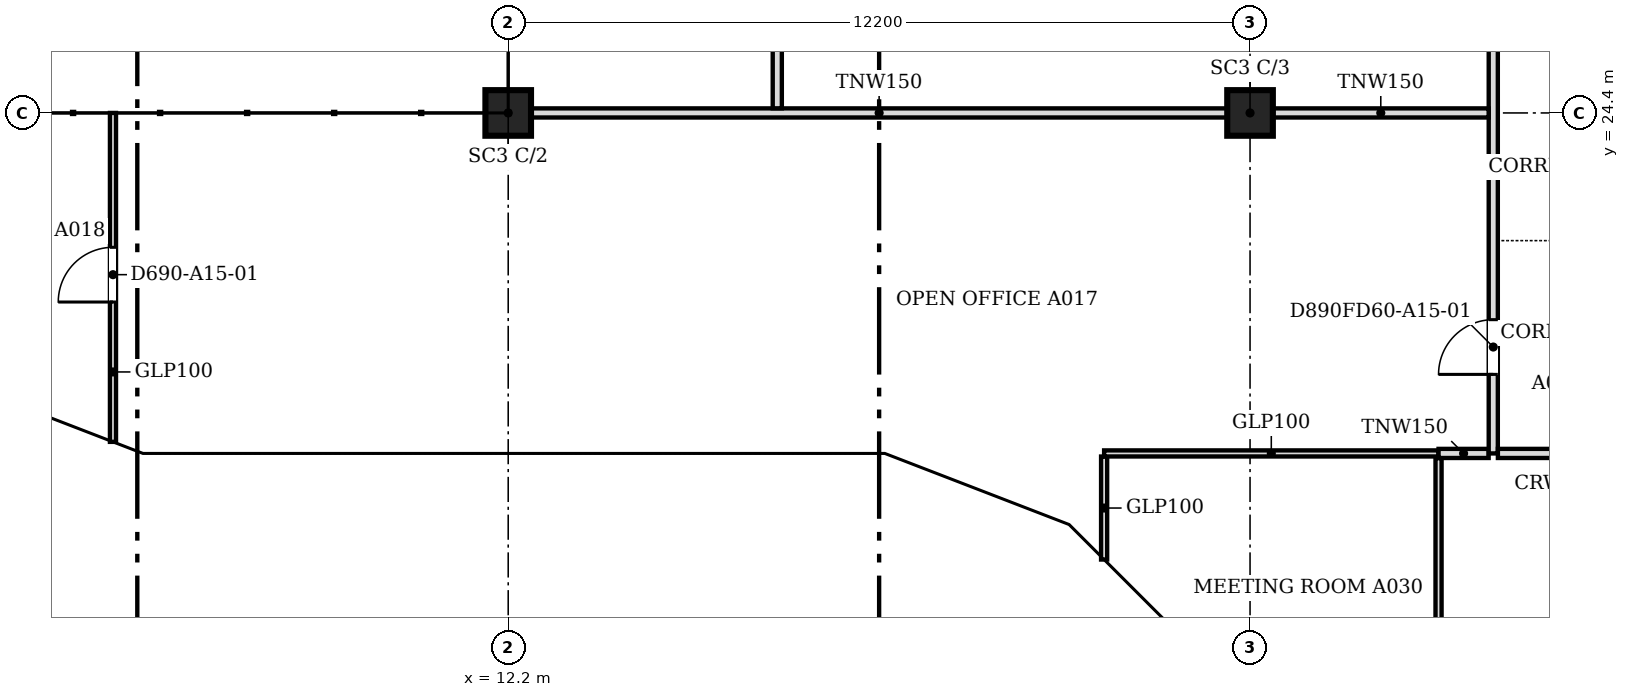
"""IFC4 building model, lengths in metres.
Left out: names, types, materials, properties, quantities, classifications, styles, units other than length and angle.
Written with IfcOpenShell. Run it as: python <this file> out.ifc"""

import sys

from ifc_helpers import new_model, si_unit, direction, frame, frame_2d, origin, origin_2d, place, context, subcontext, project, spatial, polyline, rectangle, outline, extrude, faceted_brep, source, transform, mapped, element, fill, save


model = new_model("IFC4")
c1 = context("Model", 3, precision=1e-05, world=origin(), true_north=direction((0.0, 1.0)))
c2 = subcontext(c1, "Body", "Model", "MODEL_VIEW")
j1 = project(units=[si_unit("LENGTHUNIT", "METRE"), si_unit("PLANEANGLEUNIT", "RADIAN")], contexts=[c1])
p1 = place(None, origin())
s1 = spatial("IfcSite", under=j1, at=p1, CompositionType="ELEMENT")
p2 = place(p1, origin())
s2 = spatial("IfcBuilding", under=s1, at=p2, CompositionType="ELEMENT")
p3 = place(p2, frame((0.0, 0.0, 170.6)))
s3 = spatial("IfcBuildingStorey", under=s2, at=p3, CompositionType="ELEMENT", Elevation=170.6)
for number, where, z_axis, x_axis in (
    (1, (12.2, 24.4, 0.0), (0.0, 0.0, 1.0), (1.0, 0.0, 0.0)),
    (2, (24.4, 24.4, 0.0), (0.0, 0.0, 1.0), (1.0, 0.0, 0.0)),
):
    element("IfcColumn", number, at=place(p3, frame(where, z_axis=z_axis, x_axis=x_axis)), inside=s3, PredefinedType="COLUMN", context=c2, shape_type="SweptSolid", body=[
        extrude(rectangle(XDim=0.75, YDim=0.75, at=origin_2d()), origin(), (0.0, 0.0, 1.0), 3.6),
    ])
m1 = source(origin(), c2, "Body", "Brep", [
    faceted_brep([(2.95, -0.25, 0.0), (2.997, -0.25, 0.059), (2.997, -0.25, 7.541), (2.95, -0.25, 7.6), (0.0, -0.25, 3.8), (0.053, 0.25, 3.868), (2.904, 0.25, 7.54), (2.904, 0.25, 0.06), (0.053, 0.25, 3.732), (2.95, 0.0, 0.0), (2.95, 0.0, 7.6), (0.0, 0.0, 3.8)], [[[0, 1, 2, 3, 4]], [[5, 6, 7, 8]], [[1, 0, 9]], [[10, 3, 2]], [[6, 5, 11, 4, 3, 10]], [[8, 7, 9, 0, 4, 11]], [[8, 11, 5]], [[1, 9, 7, 6, 10, 2]]]),
])
p4 = place(p3, frame((3.394, 19.612, -3.8), z_axis=(0.0, 0.0, 1.0), x_axis=(0.932990326376, -0.359901446078, 0.0)))
e3 = element("IfcWall", 3, at=p4, inside=s3, PredefinedType="SOLIDWALL", context=c2, shape_type="MappedRepresentation", body=[
    mapped(m1, transform((0.0, 0.0, 0.0), scale=1.0)),
])
m2 = source(origin(), c2, "Body", "SweptSolid", [
    extrude(outline(polyline([(2.75, 6.935), (0.316, 3.8), (2.75, 0.665), (2.75, 6.935)])), frame((0.0, 0.26, 0.0), z_axis=(0.0, -1.0, 0.0), x_axis=(1.0, 0.0, 0.0)), (0.0, 0.0, 1.0), 0.52),
])
p5 = place(p4, origin())
e4 = element("IfcOpeningElement", 4, at=p5, cuts=e3, PredefinedType="OPENING", context=c2, shape_type="MappedRepresentation", body=[
    mapped(m2, transform((0.0, 0.0, 0.0), scale=1.0)),
])
m3 = source(origin(), c2, "Body", "Brep", [
    faceted_brep([(0.047, -0.25, 0.0), (3.05, -0.25, 3.8), (0.047, -0.25, 7.6), (0.0, -0.25, 7.54), (0.0, -0.25, 0.06), (0.093, 0.25, 7.541), (3.05, 0.25, 3.8), (0.093, 0.25, 0.059), (0.047, 0.0, 0.0), (0.047, 0.0, 7.6)], [[[0, 1, 2, 3, 4]], [[5, 6, 7]], [[7, 6, 1, 0, 8]], [[6, 5, 9, 2, 1]], [[3, 2, 9]], [[8, 0, 4]], [[7, 8, 4, 3, 9, 5]]]),
])
p6 = place(p3, frame((6.1, 18.55, -3.8), z_axis=(0.0, 0.0, 1.0), x_axis=(1.0, 0.0, 0.0)))
e5 = element("IfcWall", 5, at=p6, inside=s3, PredefinedType="SOLIDWALL", context=c2, shape_type="MappedRepresentation", body=[
    mapped(m3, transform((0.0, 0.0, 0.0), scale=1.0)),
])
m4 = source(origin(), c2, "Body", "SweptSolid", [
    extrude(outline(polyline([(0.247, 0.656), (2.731, 3.8), (0.247, 6.944), (0.247, 0.656)])), frame((0.0, 0.26, 0.0), z_axis=(0.0, -1.0, 0.0), x_axis=(1.0, 0.0, 0.0)), (0.0, 0.0, 1.0), 0.52),
])
p7 = place(p6, origin())
e6 = element("IfcOpeningElement", 6, at=p7, cuts=e5, PredefinedType="OPENING", context=c2, shape_type="MappedRepresentation", body=[
    mapped(m4, transform((0.0, 0.0, 0.0), scale=1.0)),
])
m5 = source(origin(), c2, "Body", "SweptSolid", [
    extrude(outline(polyline([(3.05, 0.0), (6.1, 3.8), (3.05, 7.6), (0.0, 3.8), (3.05, 0.0)])), frame((0.0, 0.25, 0.0), z_axis=(0.0, -1.0, 0.0), x_axis=(1.0, 0.0, 0.0)), (0.0, 0.0, 1.0), 0.5),
])
p8 = place(p3, frame((9.15, 18.55, -3.8), z_axis=(0.0, 0.0, 1.0), x_axis=(1.0, 0.0, 0.0)))
e7 = element("IfcWall", 7, at=p8, inside=s3, PredefinedType="SOLIDWALL", context=c2, shape_type="MappedRepresentation", body=[
    mapped(m5, transform((0.0, 0.0, 0.0), scale=1.0)),
])
m6 = source(origin(), c2, "Body", "SweptSolid", [
    extrude(outline(polyline([(3.05, 0.399), (5.78, 3.8), (3.05, 7.2), (0.321, 3.8), (3.05, 0.399)])), frame((0.0, 0.26, 0.0), z_axis=(0.0, -1.0, 0.0), x_axis=(1.0, 0.0, 0.0)), (0.0, 0.0, 1.0), 0.52),
])
p9 = place(p8, origin())
e8 = element("IfcOpeningElement", 8, at=p9, cuts=e7, PredefinedType="OPENING", context=c2, shape_type="MappedRepresentation", body=[
    mapped(m6, transform((0.0, 0.0, 0.0), scale=1.0)),
])
m7 = source(origin(), c2, "Body", "Brep", [
    faceted_brep([(3.05, -0.25, 7.543), (0.0, -0.25, 3.8), (3.05, -0.25, 0.057), (0.0, 0.25, 3.8), (3.096, 0.25, 7.6), (3.143, 0.25, 7.543), (3.143, 0.25, 0.056), (3.096, 0.25, 0.0), (3.096, -0.0, 0.0), (3.096, -0.0, 7.6)], [[[0, 1, 2]], [[3, 4, 5, 6, 7]], [[7, 6, 8]], [[5, 4, 9]], [[4, 3, 1, 0, 9]], [[3, 7, 8, 2, 1]], [[2, 8, 6, 5, 9, 0]]]),
])
p10 = place(p3, frame((15.25, 18.55, -3.8), z_axis=(0.0, 0.0, 1.0), x_axis=(1.0, 0.0, 0.0)))
e9 = element("IfcWall", 9, at=p10, inside=s3, PredefinedType="SOLIDWALL", context=c2, shape_type="MappedRepresentation", body=[
    mapped(m7, transform((0.0, 0.0, 0.0), scale=1.0)),
])
m8 = source(origin(), c2, "Body", "SweptSolid", [
    extrude(outline(polyline([(2.896, 6.959), (0.323, 3.8), (2.896, 0.641), (2.896, 6.959)])), frame((0.0, 0.26, 0.0), z_axis=(0.0, -1.0, 0.0), x_axis=(1.0, 0.0, 0.0)), (0.0, 0.0, 1.0), 0.52),
])
p11 = place(p10, origin())
e10 = element("IfcOpeningElement", 10, at=p11, cuts=e9, PredefinedType="OPENING", context=c2, shape_type="MappedRepresentation", body=[
    mapped(m8, transform((0.0, 0.0, 0.0), scale=1.0)),
])
m9 = source(origin(), c2, "Body", "Brep", [
    faceted_brep([(0.093, -0.25, 0.056), (3.143, -0.25, 3.736), (3.143, -0.25, 3.864), (0.093, -0.25, 7.544), (0.0, 0.25, 7.543), (0.047, 0.25, 7.6), (3.196, 0.25, 3.8), (0.047, 0.25, 0.0), (0.0, 0.25, 0.057), (3.196, -0.0, 3.8), (0.047, 0.0, 0.0), (0.047, 0.0, 7.6)], [[[0, 1, 2, 3]], [[4, 5, 6, 7, 8]], [[7, 6, 9, 1, 0, 10]], [[6, 5, 11, 3, 2, 9]], [[5, 4, 11]], [[8, 7, 10]], [[8, 10, 0, 3, 11, 4]], [[1, 9, 2]]]),
])
p12 = place(p3, frame((18.303, 18.567, -3.8), z_axis=(0.0, 0.0, 1.0), x_axis=(0.932978940178, -0.359930961693, 0.0)))
e11 = element("IfcWall", 11, at=p12, inside=s3, PredefinedType="SOLIDWALL", context=c2, shape_type="MappedRepresentation", body=[
    mapped(m9, transform((0.0, 0.0, 0.0), scale=1.0)),
])
m10 = source(origin(), c2, "Body", "SweptSolid", [
    extrude(outline(polyline([(0.247, 0.633), (2.871, 3.8), (0.247, 6.967), (0.247, 0.633)])), frame((0.0, 0.26, 0.0), z_axis=(0.0, -1.0, 0.0), x_axis=(1.0, 0.0, 0.0)), (0.0, 0.0, 1.0), 0.52),
])
p13 = place(p12, origin())
e12 = element("IfcOpeningElement", 12, at=p13, cuts=e11, PredefinedType="OPENING", context=c2, shape_type="MappedRepresentation", body=[
    mapped(m10, transform((0.0, 0.0, 0.0), scale=1.0)),
])
m11 = source(origin(), c2, "Body", "Brep", [
    faceted_brep([(3.103, -0.25, 7.536), (0.053, -0.25, 3.864), (0.053, -0.25, 3.736), (3.103, -0.25, 0.064), (0.0, 0.25, 3.8), (3.156, 0.25, 7.6), (3.209, 0.25, 7.536), (3.209, 0.25, 0.064), (3.156, 0.25, 0.0), (3.156, -0.0, 0.0), (3.156, -0.0, 7.6), (0.0, 0.0, 3.8)], [[[0, 1, 2, 3]], [[4, 5, 6, 7, 8]], [[8, 7, 9]], [[6, 5, 10]], [[5, 4, 11, 1, 0, 10]], [[4, 8, 9, 3, 2, 11]], [[2, 1, 11]], [[3, 9, 7, 6, 10, 0]]]),
])
p14 = place(p3, frame((21.285, 17.417, -3.8), z_axis=(0.0, 0.0, 1.0), x_axis=(0.707106781187, -0.707106781187, 0.0)))
e13 = element("IfcWall", 13, at=p14, inside=s3, PredefinedType="SOLIDWALL", context=c2, shape_type="MappedRepresentation", body=[
    mapped(m11, transform((0.0, 0.0, 0.0), scale=1.0)),
])
m12 = source(origin(), c2, "Body", "SweptSolid", [
    extrude(outline(polyline([(2.956, 6.968), (0.325, 3.8), (2.956, 0.632), (2.956, 6.968)])), frame((0.0, 0.26, 0.0), z_axis=(0.0, -1.0, 0.0), x_axis=(1.0, 0.0, 0.0)), (0.0, 0.0, 1.0), 0.52),
])
p15 = place(p14, origin())
e14 = element("IfcOpeningElement", 14, at=p15, cuts=e13, PredefinedType="OPENING", context=c2, shape_type="MappedRepresentation", body=[
    mapped(m12, transform((0.0, 0.0, 0.0), scale=1.0)),
])
p16 = place(p2, frame((0.0, 0.0, 174.4)))
s4 = spatial("IfcBuildingStorey", under=s2, at=p16, CompositionType="ELEMENT", Elevation=174.4)
m13 = source(origin(), c2, "Body", "Brep", [
    faceted_brep([(0.053, -0.25, 0.0), (3.003, -0.25, 3.8), (0.053, -0.25, 7.6), (0.0, -0.25, 7.531), (0.0, -0.25, 0.068), (0.106, 0.25, 7.532), (2.957, 0.25, 3.86), (2.957, 0.25, 3.74), (0.106, 0.25, 0.068), (3.003, 0.0, 3.8), (0.053, 0.0, 0.0), (0.053, 0.0, 7.6)], [[[0, 1, 2, 3, 4]], [[5, 6, 7, 8]], [[8, 7, 9, 1, 0, 10]], [[6, 5, 11, 2, 1, 9]], [[3, 2, 11]], [[10, 0, 4]], [[8, 10, 4, 3, 11, 5]], [[9, 7, 6]]]),
])
p17 = place(p16, frame((3.344, 19.631, -3.8), z_axis=(0.0, 0.0, 1.0), x_axis=(0.933007896601, -0.359855894603, 0.0)))
e15 = element("IfcWall", 15, at=p17, inside=s4, PredefinedType="SOLIDWALL", context=c2, shape_type="MappedRepresentation", body=[
    mapped(m13, transform((0.0, 0.0, 0.0), scale=1.0)),
])
m14 = source(origin(), c2, "Body", "SweptSolid", [
    extrude(outline(polyline([(0.253, 0.665), (2.687, 3.8), (0.253, 6.935), (0.253, 0.665)])), frame((0.0, 0.26, 0.0), z_axis=(0.0, -1.0, 0.0), x_axis=(1.0, 0.0, 0.0)), (0.0, 0.0, 1.0), 0.52),
])
p18 = place(p17, origin())
e16 = element("IfcOpeningElement", 16, at=p18, cuts=e15, PredefinedType="OPENING", context=c2, shape_type="MappedRepresentation", body=[
    mapped(m14, transform((0.0, 0.0, 0.0), scale=1.0)),
])
m15 = source(origin(), c2, "Body", "Brep", [
    faceted_brep([(3.003, -0.25, 0.0), (6.053, -0.25, 3.8), (3.003, -0.25, 7.6), (0.0, -0.25, 3.8), (0.047, 0.25, 3.859), (3.003, 0.25, 7.6), (6.053, 0.25, 3.8), (3.003, 0.25, 0.0), (0.047, 0.25, 3.741), (0.0, 0.0, 3.8)], [[[0, 1, 2, 3]], [[4, 5, 6, 7, 8]], [[7, 6, 1, 0]], [[6, 5, 2, 1]], [[5, 4, 9, 3, 2]], [[8, 7, 0, 3, 9]], [[8, 9, 4]]]),
])
p19 = place(p16, frame((6.146, 18.55, -3.8), z_axis=(0.0, 0.0, 1.0), x_axis=(1.0, 0.0, 0.0)))
e17 = element("IfcWall", 17, at=p19, inside=s4, PredefinedType="SOLIDWALL", context=c2, shape_type="MappedRepresentation", body=[
    mapped(m15, transform((0.0, 0.0, 0.0), scale=1.0)),
])
m16 = source(origin(), c2, "Body", "SweptSolid", [
    extrude(outline(polyline([(3.005, 0.401), (5.733, 3.8), (3.005, 7.199), (0.319, 3.8), (3.005, 0.401)])), frame((0.0, 0.26, 0.0), z_axis=(0.0, -1.0, 0.0), x_axis=(1.0, 0.0, 0.0)), (0.0, 0.0, 1.0), 0.52),
])
p20 = place(p19, origin())
e18 = element("IfcOpeningElement", 18, at=p20, cuts=e17, PredefinedType="OPENING", context=c2, shape_type="MappedRepresentation", body=[
    mapped(m16, transform((0.0, 0.0, 0.0), scale=1.0)),
])
m17 = source(origin(), c2, "Body", "Brep", [
    faceted_brep([(3.05, -0.25, 0.0), (6.1, -0.25, 3.743), (6.1, -0.25, 3.857), (3.05, -0.25, 7.6), (0.0, -0.25, 3.8), (0.0, 0.25, 3.8), (3.05, 0.25, 7.6), (6.146, 0.25, 3.8), (3.05, 0.25, 0.0), (6.146, -0.0, 3.8)], [[[0, 1, 2, 3, 4]], [[5, 6, 7, 8]], [[8, 7, 9, 1, 0]], [[7, 6, 3, 2, 9]], [[6, 5, 4, 3]], [[5, 8, 0, 4]], [[1, 9, 2]]]),
])
p21 = place(p16, frame((12.2, 18.55, -3.8), z_axis=(0.0, 0.0, 1.0), x_axis=(1.0, 0.0, 0.0)))
e19 = element("IfcWall", 19, at=p21, inside=s4, PredefinedType="SOLIDWALL", context=c2, shape_type="MappedRepresentation", body=[
    mapped(m17, transform((0.0, 0.0, 0.0), scale=1.0)),
])
m18 = source(origin(), c2, "Body", "SweptSolid", [
    extrude(outline(polyline([(3.052, 0.397), (5.824, 3.8), (3.052, 7.202), (0.321, 3.8), (3.052, 0.397)])), frame((0.0, 0.26, 0.0), z_axis=(0.0, -1.0, 0.0), x_axis=(1.0, 0.0, 0.0)), (0.0, 0.0, 1.0), 0.52),
])
p22 = place(p21, origin())
e20 = element("IfcOpeningElement", 20, at=p22, cuts=e19, PredefinedType="OPENING", context=c2, shape_type="MappedRepresentation", body=[
    mapped(m18, transform((0.0, 0.0, 0.0), scale=1.0)),
])
m19 = source(origin(), c2, "Body", "Brep", [
    faceted_brep([(3.096, -0.25, 7.536), (0.047, -0.25, 3.856), (0.047, -0.25, 3.744), (3.096, -0.25, 0.064), (0.0, 0.25, 3.8), (3.149, 0.25, 7.6), (3.202, 0.25, 7.536), (3.202, 0.25, 0.064), (3.149, 0.25, 0.0), (3.149, -0.0, 0.0), (3.149, -0.0, 7.6), (0.0, 0.0, 3.8)], [[[0, 1, 2, 3]], [[4, 5, 6, 7, 8]], [[8, 7, 9]], [[6, 5, 10]], [[5, 4, 11, 1, 0, 10]], [[4, 8, 9, 3, 2, 11]], [[11, 2, 1]], [[3, 9, 7, 6, 10, 0]]]),
])
p23 = place(p16, frame((18.346, 18.55, -3.8), z_axis=(0.0, 0.0, 1.0), x_axis=(0.932985567668, -0.359913782069, 0.0)))
e21 = element("IfcWall", 21, at=p23, inside=s4, PredefinedType="SOLIDWALL", context=c2, shape_type="MappedRepresentation", body=[
    mapped(m19, transform((0.0, 0.0, 0.0), scale=1.0)),
])
m20 = source(origin(), c2, "Body", "SweptSolid", [
    extrude(outline(polyline([(2.949, 6.967), (0.325, 3.8), (2.949, 0.633), (2.949, 6.967)])), frame((0.0, 0.26, 0.0), z_axis=(0.0, -1.0, 0.0), x_axis=(1.0, 0.0, 0.0)), (0.0, 0.0, 1.0), 0.52),
])
p24 = place(p23, origin())
e22 = element("IfcOpeningElement", 22, at=p24, cuts=e21, PredefinedType="OPENING", context=c2, shape_type="MappedRepresentation", body=[
    mapped(m20, transform((0.0, 0.0, 0.0), scale=1.0)),
])
m21 = source(origin(), c2, "Body", "Brep", [
    faceted_brep([(0.106, -0.25, 0.064), (3.156, -0.25, 3.736), (3.156, -0.25, 3.864), (0.106, -0.25, 7.536), (0.0, 0.25, 7.536), (0.053, 0.25, 7.6), (3.209, 0.25, 3.8), (0.053, 0.25, 0.0), (0.0, 0.25, 0.064), (3.209, -0.0, 3.8), (0.053, 0.0, 0.0), (0.053, 0.0, 7.6)], [[[0, 1, 2, 3]], [[4, 5, 6, 7, 8]], [[7, 6, 9, 1, 0, 10]], [[6, 5, 11, 3, 2, 9]], [[5, 4, 11]], [[8, 7, 10]], [[8, 10, 0, 3, 11, 4]], [[1, 9, 2]]]),
])
p25 = place(p16, frame((21.248, 17.454, -3.8), z_axis=(0.0, 0.0, 1.0), x_axis=(0.707106781187, -0.707106781187, 0.0)))
e23 = element("IfcWall", 23, at=p25, inside=s4, PredefinedType="SOLIDWALL", context=c2, shape_type="MappedRepresentation", body=[
    mapped(m21, transform((0.0, 0.0, 0.0), scale=1.0)),
])
m22 = source(origin(), c2, "Body", "SweptSolid", [
    extrude(outline(polyline([(0.253, 0.632), (2.884, 3.8), (0.253, 6.968), (0.253, 0.632)])), frame((0.0, 0.26, 0.0), z_axis=(0.0, -1.0, 0.0), x_axis=(1.0, 0.0, 0.0)), (0.0, 0.0, 1.0), 0.52),
])
p26 = place(p25, origin())
e24 = element("IfcOpeningElement", 24, at=p26, cuts=e23, PredefinedType="OPENING", context=c2, shape_type="MappedRepresentation", body=[
    mapped(m22, transform((0.0, 0.0, 0.0), scale=1.0)),
])
p27 = place(p3, frame((27.5, 10.276, 0.0), z_axis=(0.0, 0.0, 1.0), x_axis=(0.0, 1.0, 0.0)))
e25 = element("IfcWall", 25, at=p27, inside=s3, PredefinedType="PARTITIONING", context=c2, shape_type="SweptSolid", body=[
    extrude(rectangle(XDim=8.448, YDim=0.1, at=frame_2d((4.224, 0.0))), origin(), (0.0, 0.0, 1.0), 3.067),
])
m23 = source(origin(), c2, "Body", "SweptSolid", [
    extrude(rectangle(XDim=0.9, YDim=2.1, at=frame_2d((0.45, 1.05))), frame((0.0, 0.06, 0.0), z_axis=(0.0, -1.0, 0.0), x_axis=(1.0, 0.0, 0.0)), (0.0, 0.0, 1.0), 0.12),
])
p28 = place(p27, frame((3.8, 0.0, 0.0)))
e26 = element("IfcOpeningElement", 26, at=p28, cuts=e25, PredefinedType="OPENING", context=c2, shape_type="MappedRepresentation", body=[
    mapped(m23, transform((0.0, 0.0, 0.0), scale=1.0)),
])
p29 = place(p3, frame((22.0, 17.055, 0.0), z_axis=(0.0, 0.0, 1.0), x_axis=(0.0, 1.0, 0.0)))
e27 = element("IfcWall", 27, at=p29, inside=s3, PredefinedType="PARTITIONING", context=c2, shape_type="SweptSolid", body=[
    extrude(rectangle(XDim=1.694, YDim=0.1, at=frame_2d((0.847, 0.0))), origin(), (0.0, 0.0, 1.0), 3.067),
])
p30 = place(p3, frame((22.0, 18.8, 0.0), z_axis=(0.0, 0.0, 1.0), x_axis=(1.0, 0.0, 0.0)))
e28 = element("IfcWall", 28, at=p30, inside=s3, PredefinedType="PARTITIONING", context=c2, shape_type="SweptSolid", body=[
    extrude(rectangle(XDim=5.499, YDim=0.1, at=frame_2d((2.75, 0.0))), origin(), (0.0, 0.0, 1.0), 3.067),
])
p31 = place(p3, frame((27.5, 18.8, 0.0), z_axis=(0.0, 0.0, 1.0), x_axis=(1.0, 0.0, 0.0)))
e29 = element("IfcWall", 29, at=p31, inside=s3, PredefinedType="PARTITIONING", context=c2, shape_type="SweptSolid", body=[
    extrude(rectangle(XDim=0.824, YDim=0.15, at=frame_2d((0.412, 0.0))), origin(), (0.0, 0.0, 1.0), 3.067),
])
p32 = place(p3, frame((28.4, 18.8, 0.0), z_axis=(0.0, 0.0, 1.0), x_axis=(0.0, 1.0, 0.0)))
e30 = element("IfcWall", 30, at=p32, inside=s3, PredefinedType="PARTITIONING", context=c2, shape_type="SweptSolid", body=[
    extrude(rectangle(XDim=26.824, YDim=0.15, at=frame_2d((13.412, 0.0))), origin(), (0.0, 0.0, 1.0), 3.067),
])
m24 = source(origin(), c2, "Body", "SweptSolid", [
    extrude(rectangle(XDim=0.9, YDim=2.1, at=frame_2d((0.45, 1.05))), frame((0.0, 0.085, 0.0), z_axis=(0.0, -1.0, 0.0), x_axis=(1.0, 0.0, 0.0)), (0.0, 0.0, 1.0), 0.17),
])
p33 = place(p32, frame((1.3, 0.0, 0.0)))
e31 = element("IfcOpeningElement", 31, at=p33, cuts=e30, PredefinedType="OPENING", context=c2, shape_type="MappedRepresentation", body=[
    mapped(m24, transform((0.0, 0.0, 0.0), scale=1.0)),
])
m25 = source(origin(), c2, "Body", "SweptSolid", [
    extrude(rectangle(XDim=1.0, YDim=2.1, at=frame_2d((0.5, 1.05))), frame((0.0, 0.085, 0.0), z_axis=(0.0, -1.0, 0.0), x_axis=(1.0, 0.0, 0.0)), (0.0, 0.0, 1.0), 0.17),
])
p34 = place(p32, frame((23.351, 0.0, 0.0)))
e32 = element("IfcOpeningElement", 32, at=p34, cuts=e30, PredefinedType="OPENING", context=c2, shape_type="MappedRepresentation", body=[
    mapped(m25, transform((0.0, 0.0, 0.0), scale=1.0)),
])
p35 = place(p32, frame((8.1, 0.0, 0.0)))
e33 = element("IfcOpeningElement", 33, at=p35, cuts=e30, PredefinedType="OPENING", context=c2, shape_type="MappedRepresentation", body=[
    mapped(m25, transform((0.0, 0.0, 0.0), scale=1.0)),
])
p36 = place(p32, frame((15.8, 0.0, 0.0)))
e34 = element("IfcOpeningElement", 34, at=p36, cuts=e30, PredefinedType="OPENING", context=c2, shape_type="MappedRepresentation", body=[
    mapped(m24, transform((0.0, 0.0, 0.0), scale=1.0)),
])
p37 = place(p3, frame((28.476, 18.8, 0.0), z_axis=(0.0, 0.0, 1.0), x_axis=(1.0, 0.0, 0.0)))
e35 = element("IfcWall", 35, at=p37, inside=s3, PredefinedType="PARTITIONING", context=c2, shape_type="SweptSolid", body=[
    extrude(rectangle(XDim=1.948, YDim=0.15, at=frame_2d((0.974, 0.0))), origin(), (0.0, 0.0, 1.0), 3.067),
])
p38 = place(p3, frame((5.7, 18.99, 0.0), z_axis=(0.0, 0.0, 1.0), x_axis=(0.0, 1.0, 0.0)))
e36 = element("IfcWall", 36, at=p38, inside=s3, PredefinedType="PARTITIONING", context=c2, shape_type="SweptSolid", body=[
    extrude(rectangle(XDim=5.41, YDim=0.1, at=frame_2d((2.705, 0.0))), origin(), (0.0, 0.0, 1.0), 3.067),
])
p39 = place(p38, frame((2.3, 0.0, 0.0)))
e37 = element("IfcOpeningElement", 37, at=p39, cuts=e36, PredefinedType="OPENING", context=c2, shape_type="MappedRepresentation", body=[
    mapped(m23, transform((0.0, 0.0, 0.0), scale=1.0)),
])
p40 = place(p3, frame((12.576, 24.4, 0.0), z_axis=(0.0, 0.0, 1.0), x_axis=(1.0, 0.0, 0.0)))
e38 = element("IfcWall", 38, at=p40, inside=s3, PredefinedType="PARTITIONING", context=c2, shape_type="SweptSolid", body=[
    extrude(rectangle(XDim=11.448, YDim=0.15, at=frame_2d((5.724, 0.0))), origin(), (0.0, 0.0, 1.0), 3.067),
])
p41 = place(p3, frame((24.776, 24.4, 0.0), z_axis=(0.0, 0.0, 1.0), x_axis=(1.0, 0.0, 0.0)))
e39 = element("IfcWall", 39, at=p41, inside=s3, PredefinedType="PARTITIONING", context=c2, shape_type="SweptSolid", body=[
    extrude(rectangle(XDim=3.548, YDim=0.15, at=frame_2d((1.774, 0.0))), origin(), (0.0, 0.0, 1.0), 3.067),
])
p42 = place(p3, frame((16.625, 24.476, 0.0), z_axis=(0.0, 0.0, 1.0), x_axis=(0.0, 1.0, 0.0)))
e40 = element("IfcWall", 40, at=p42, inside=s3, PredefinedType="PARTITIONING", context=c2, shape_type="SweptSolid", body=[
    extrude(rectangle(XDim=6.024, YDim=0.15, at=frame_2d((3.012, 0.0))), origin(), (0.0, 0.0, 1.0), 3.067),
])
p43 = place(p42, frame((2.6, 0.0, 0.0)))
e41 = element("IfcOpeningElement", 41, at=p43, cuts=e40, PredefinedType="OPENING", context=c2, shape_type="MappedRepresentation", body=[
    mapped(m24, transform((0.0, 0.0, 0.0), scale=1.0)),
])
m26 = source(origin(), c2, "Body", "SweptSolid", [
    extrude(rectangle(XDim=0.9, YDim=2.1, at=frame_2d((0.45, 1.05))), frame((0.0, 0.025, 0.0), z_axis=(0.0, -1.0, 0.0), x_axis=(1.0, 0.0, 0.0)), (0.0, 0.0, 1.0), 0.05),
])
p44 = place(p33, origin())
e42 = element("IfcDoor", 42, at=p44, inside=s3, OperationType="SINGLE_SWING_LEFT", PredefinedType="DOOR", context=c2, shape_type="MappedRepresentation", body=[
    mapped(m26, transform((0.0, 0.0, 0.0), scale=1.0)),
])
fill(e31, e42)
p45 = place(p39, origin())
e43 = element("IfcDoor", 43, at=p45, inside=s3, OperationType="SINGLE_SWING_LEFT", PredefinedType="DOOR", context=c2, shape_type="MappedRepresentation", body=[
    mapped(m26, transform((0.0, 0.0, 0.0), scale=1.0)),
])
fill(e37, e43)
save(model, sys.argv[1])
